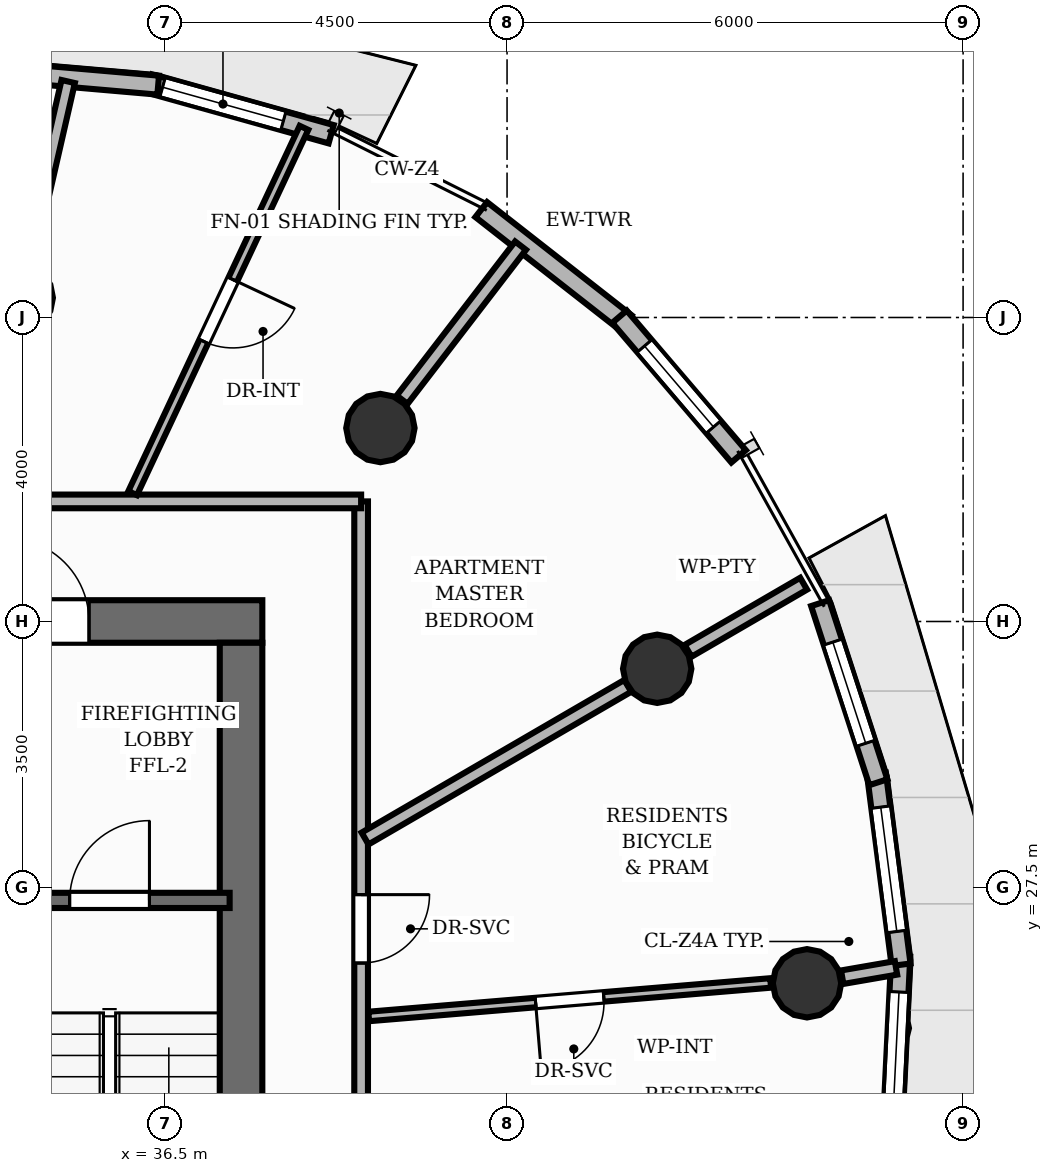
"""IFC4 building model, lengths in metres.
Left out: names, types, materials, properties, quantities, classifications, styles, units other than length and angle.
Written with IfcOpenShell. Run it as: python <this file> out.ifc"""

import sys

from ifc_helpers import new_model, si_unit, direction, frame, frame_2d, origin, origin_2d, place, context, subcontext, project, spatial, rectangle, circle, extrude, element, fill, save


model = new_model("IFC4")
c1 = context("Model", 3, precision=1e-05, world=origin(), true_north=direction((0.0, 1.0)))
c2 = subcontext(c1, "Body", "Model", "MODEL_VIEW")
j1 = project(units=[si_unit("LENGTHUNIT", "METRE"), si_unit("PLANEANGLEUNIT", "RADIAN")], contexts=[c1])
p1 = place(None, origin())
s1 = spatial("IfcSite", under=j1, at=p1, CompositionType="ELEMENT")
p2 = place(p1, origin())
s2 = spatial("IfcBuilding", under=s1, at=p2, CompositionType="ELEMENT")
p3 = place(p2, frame((0.0, 0.0, 191.84)))
s3 = spatial("IfcBuildingStorey", under=s2, at=p3, CompositionType="ELEMENT", Elevation=191.84)
p4 = place(p3, frame((26.22, 31.0, 0.0), z_axis=(0.0, 0.0, 1.0), x_axis=(1.0, 0.0, 0.0)))
e1 = element("IfcWall", 1, at=p4, inside=s3, PredefinedType="SHEAR", context=c2, shape_type="SweptSolid", body=[
    extrude(rectangle(XDim=11.56, YDim=0.56, at=frame_2d((5.78, 0.0))), origin(), (0.0, 0.0, 1.0), 3.2),
])
p5 = place(p4, frame((8.18, 0.0, 0.0)))
e2 = element("IfcOpeningElement", 2, at=p5, cuts=e1, PredefinedType="OPENING", context=c2, shape_type="SweptSolid", body=[
    extrude(rectangle(XDim=1.1, YDim=2.15, at=frame_2d((0.55, 1.075))), frame((0.0, 0.29, 0.0), z_axis=(0.0, -1.0, 0.0), x_axis=(1.0, 0.0, 0.0)), (0.0, 0.0, 1.0), 0.58),
])
p6 = place(p4, frame((0.805, 0.0, 0.0)))
e3 = element("IfcOpeningElement", 3, at=p6, cuts=e1, PredefinedType="OPENING", context=c2, shape_type="SweptSolid", body=[
    extrude(rectangle(XDim=1.05, YDim=2.15, at=frame_2d((0.525, 1.075))), frame((0.0, 0.29, 0.0), z_axis=(0.0, -1.0, 0.0), x_axis=(1.0, 0.0, 0.0)), (0.0, 0.0, 1.0), 0.58),
])
p7 = place(p4, frame((2.555, 0.0, 0.0)))
e4 = element("IfcOpeningElement", 4, at=p7, cuts=e1, PredefinedType="OPENING", context=c2, shape_type="SweptSolid", body=[
    extrude(rectangle(XDim=1.05, YDim=2.15, at=frame_2d((0.525, 1.075))), frame((0.0, 0.29, 0.0), z_axis=(0.0, -1.0, 0.0), x_axis=(1.0, 0.0, 0.0)), (0.0, 0.0, 1.0), 0.58),
])
p8 = place(p4, frame((4.305, 0.0, 0.0)))
e5 = element("IfcOpeningElement", 5, at=p8, cuts=e1, PredefinedType="OPENING", context=c2, shape_type="SweptSolid", body=[
    extrude(rectangle(XDim=1.05, YDim=2.15, at=frame_2d((0.525, 1.075))), frame((0.0, 0.29, 0.0), z_axis=(0.0, -1.0, 0.0), x_axis=(1.0, 0.0, 0.0)), (0.0, 0.0, 1.0), 0.58),
])
p9 = place(p3, frame((37.5, 17.28, 0.0), z_axis=(0.0, 0.0, 1.0), x_axis=(0.0, 1.0, 0.0)))
e6 = element("IfcWall", 6, at=p9, inside=s3, PredefinedType="SHEAR", context=c2, shape_type="SweptSolid", body=[
    extrude(rectangle(XDim=13.44, YDim=0.56, at=frame_2d((6.72, 0.0))), origin(), (0.0, 0.0, 1.0), 3.2),
])
for number, where, z_axis, x_axis in (
    (7, (44.946, 26.24, 0.0), (0.0, 0.0, 1.0), (1.0, 0.0, 0.0)),
    (8, (42.975, 30.378, 0.0), (0.0, 0.0, 1.0), (1.0, 0.0, 0.0)),
    (9, (39.333, 33.545, 0.0), (0.0, 0.0, 1.0), (1.0, 0.0, 0.0)),
    (10, (34.575, 35.26, 0.0), (0.0, 0.0, 1.0), (1.0, 0.0, 0.0)),
):
    element("IfcColumn", number, at=place(p3, frame(where, z_axis=z_axis, x_axis=x_axis)), inside=s3, PredefinedType="COLUMN", context=c2, shape_type="SweptSolid", body=[
        extrude(circle(Radius=0.45, at=origin_2d()), origin(), (0.0, 0.0, 1.0), 3.2),
    ])
p10 = place(p3, frame((40.661, 36.42, 0.0), z_axis=(0.0, 0.0, 1.0), x_axis=(0.787404715416, -0.616436382883, 0.0)))
e11 = element("IfcWall", 11, at=p10, inside=s3, PredefinedType="SOLIDWALL", context=c2, shape_type="SweptSolid", body=[
    extrude(rectangle(XDim=2.415, YDim=0.25, at=frame_2d((1.208, 0.0))), origin(), (0.0, 0.0, 1.0), 2.96),
])
p11 = place(p3, frame((36.299, 38.077, 0.0), z_axis=(0.0, 0.0, 1.0), x_axis=(0.96316841201, -0.26889888454, 0.0)))
e12 = element("IfcWall", 12, at=p11, inside=s3, PredefinedType="SOLIDWALL", context=c2, shape_type="SweptSolid", body=[
    extrude(rectangle(XDim=2.478, YDim=0.25, at=frame_2d((1.239, 0.0))), origin(), (0.0, 0.0, 1.0), 2.96),
])
p12 = place(p11, frame((0.175, 0.0, 0.85)))
e13 = element("IfcOpeningElement", 13, at=p12, cuts=e12, PredefinedType="OPENING", context=c2, shape_type="SweptSolid", body=[
    extrude(rectangle(XDim=1.65, YDim=1.55, at=frame_2d((0.825, 0.775))), frame((0.0, 0.135, 0.0), z_axis=(0.0, -1.0, 0.0), x_axis=(1.0, 0.0, 0.0)), (0.0, 0.0, 1.0), 0.27),
])
p13 = place(p3, frame((33.888, 38.276, 0.0), z_axis=(0.0, 0.0, 1.0), x_axis=(0.996260822813, -0.08639660252, 0.0)))
e14 = element("IfcWall", 14, at=p13, inside=s3, PredefinedType="SOLIDWALL", context=c2, shape_type="SweptSolid", body=[
    extrude(rectangle(XDim=2.532, YDim=0.25, at=frame_2d((1.266, 0.0))), origin(), (0.0, 0.0, 1.0), 2.96),
])
p14 = place(p3, frame((46.18, 26.595, 0.0), z_axis=(0.0, 0.0, 1.0), x_axis=(-0.048688181414, -0.99881402723, 0.0)))
e15 = element("IfcWall", 15, at=p14, inside=s3, PredefinedType="SOLIDWALL", context=c2, shape_type="SweptSolid", body=[
    extrude(rectangle(XDim=2.593, YDim=0.25, at=frame_2d((1.296, 0.0))), origin(), (0.0, 0.0, 1.0), 2.96),
])
p15 = place(p14, frame((0.471, 0.0, 0.85)))
e16 = element("IfcOpeningElement", 16, at=p15, cuts=e15, PredefinedType="OPENING", context=c2, shape_type="SweptSolid", body=[
    extrude(rectangle(XDim=1.65, YDim=1.55, at=frame_2d((0.825, 0.775))), frame((0.0, 0.135, 0.0), z_axis=(0.0, -1.0, 0.0), x_axis=(1.0, 0.0, 0.0)), (0.0, 0.0, 1.0), 0.27),
])
p16 = place(p3, frame((45.86, 28.995, 0.0), z_axis=(0.0, 0.0, 1.0), x_axis=(0.128057007482, -0.991766808698, 0.0)))
e17 = element("IfcWall", 17, at=p16, inside=s3, PredefinedType="SOLIDWALL", context=c2, shape_type="SweptSolid", body=[
    extrude(rectangle(XDim=2.532, YDim=0.25, at=frame_2d((1.266, 0.0))), origin(), (0.0, 0.0, 1.0), 2.96),
])
p17 = place(p16, frame((0.441, 0.0, 0.85)))
e18 = element("IfcOpeningElement", 18, at=p17, cuts=e17, PredefinedType="OPENING", context=c2, shape_type="SweptSolid", body=[
    extrude(rectangle(XDim=1.65, YDim=1.55, at=frame_2d((0.825, 0.775))), frame((0.0, 0.135, 0.0), z_axis=(0.0, -1.0, 0.0), x_axis=(1.0, 0.0, 0.0)), (0.0, 0.0, 1.0), 0.27),
])
p18 = place(p3, frame((45.119, 31.241, 0.0), z_axis=(0.0, 0.0, 1.0), x_axis=(0.309005861828, -0.951060133407, 0.0)))
e19 = element("IfcWall", 19, at=p18, inside=s3, PredefinedType="SOLIDWALL", context=c2, shape_type="SweptSolid", body=[
    extrude(rectangle(XDim=2.478, YDim=0.25, at=frame_2d((1.239, 0.0))), origin(), (0.0, 0.0, 1.0), 2.96),
])
p19 = place(p18, frame((0.539, 0.0, 0.85)))
e20 = element("IfcOpeningElement", 20, at=p19, cuts=e19, PredefinedType="OPENING", context=c2, shape_type="SweptSolid", body=[
    extrude(rectangle(XDim=1.4, YDim=1.55, at=frame_2d((0.7, 0.775))), frame((0.0, 0.135, 0.0), z_axis=(0.0, -1.0, 0.0), x_axis=(1.0, 0.0, 0.0)), (0.0, 0.0, 1.0), 0.27),
])
p20 = place(p3, frame((42.479, 35.01, 0.0), z_axis=(0.0, 0.0, 1.0), x_axis=(0.648874307696, -0.760895612297, 0.0)))
e21 = element("IfcWall", 21, at=p20, inside=s3, PredefinedType="SOLIDWALL", context=c2, shape_type="SweptSolid", body=[
    extrude(rectangle(XDim=2.415, YDim=0.25, at=frame_2d((1.208, 0.0))), origin(), (0.0, 0.0, 1.0), 2.96),
])
p21 = place(p20, frame((0.507, 0.0, 0.85)))
e22 = element("IfcOpeningElement", 22, at=p21, cuts=e21, PredefinedType="OPENING", context=c2, shape_type="SweptSolid", body=[
    extrude(rectangle(XDim=1.4, YDim=1.55, at=frame_2d((0.7, 0.775))), frame((0.0, 0.135, 0.0), z_axis=(0.0, -1.0, 0.0), x_axis=(1.0, 0.0, 0.0)), (0.0, 0.0, 1.0), 0.27),
])
p22 = place(p3, frame((34.11, 27.33, 0.0), z_axis=(0.0, 0.0, 1.0), x_axis=(1.0, 0.0, 0.0)))
e23 = element("IfcWall", 23, at=p22, inside=s3, PredefinedType="SHEAR", context=c2, shape_type="SweptSolid", body=[
    extrude(rectangle(XDim=3.24, YDim=0.2, at=frame_2d((1.62, 0.0))), origin(), (0.0, 0.0, 1.0), 3.2),
])
p23 = place(p22, frame((1.135, 0.0, 0.0)))
e24 = element("IfcOpeningElement", 24, at=p23, cuts=e23, PredefinedType="OPENING", context=c2, shape_type="SweptSolid", body=[
    extrude(rectangle(XDim=1.05, YDim=2.15, at=frame_2d((0.525, 1.075))), frame((0.0, 0.11, 0.0), z_axis=(0.0, -1.0, 0.0), x_axis=(1.0, 0.0, 0.0)), (0.0, 0.0, 1.0), 0.22),
])
p24 = place(p3, frame((45.409, 26.32, 0.0), z_axis=(0.0, 0.0, 1.0), x_axis=(0.985336223431, 0.170623933826, 0.0)))
e25 = element("IfcWall", 25, at=p24, inside=s3, PredefinedType="PARTITIONING", context=c2, shape_type="SweptSolid", body=[
    extrude(rectangle(XDim=0.718, YDim=0.18, at=frame_2d((0.359, 0.0))), origin(), (0.0, 0.0, 1.0), 2.403),
])
p25 = place(p3, frame((43.382, 30.614, 0.0), z_axis=(0.0, 0.0, 1.0), x_axis=(0.86461381872, 0.502437005482, 0.0)))
e26 = element("IfcWall", 26, at=p25, inside=s3, PredefinedType="PARTITIONING", context=c2, shape_type="SweptSolid", body=[
    extrude(rectangle(XDim=1.758, YDim=0.18, at=frame_2d((0.879, 0.0))), origin(), (0.0, 0.0, 1.0), 2.403),
])
p26 = place(p3, frame((39.62, 33.918, 0.0), z_axis=(0.0, 0.0, 1.0), x_axis=(0.609249164273, 0.792978849549, 0.0)))
e27 = element("IfcWall", 27, at=p26, inside=s3, PredefinedType="PARTITIONING", context=c2, shape_type="SweptSolid", body=[
    extrude(rectangle(XDim=2.557, YDim=0.18, at=frame_2d((1.278, 0.0))), origin(), (0.0, 0.0, 1.0), 2.403),
])
p27 = place(p3, frame((34.68, 35.718, 0.0), z_axis=(0.0, 0.0, 1.0), x_axis=(0.222943921747, 0.974831271429, 0.0)))
e28 = element("IfcWall", 28, at=p27, inside=s3, PredefinedType="PARTITIONING", context=c2, shape_type="SweptSolid", body=[
    extrude(rectangle(XDim=2.448, YDim=0.18, at=frame_2d((1.224, 0.0))), origin(), (0.0, 0.0, 1.0), 2.403),
])
p28 = place(p3, frame((39.08, 32.58, 0.0), z_axis=(0.0, 0.0, 1.0), x_axis=(0.0, -1.0, 0.0)))
e29 = element("IfcWall", 29, at=p28, inside=s3, PredefinedType="PARTITIONING", context=c2, shape_type="SweptSolid", body=[
    extrude(rectangle(XDim=8.094, YDim=0.18, at=frame_2d((4.047, 0.0))), origin(), (0.0, 0.0, 1.0), 2.955),
])
p29 = place(p28, frame((5.174, 0.0, 0.0)))
e30 = element("IfcOpeningElement", 30, at=p29, cuts=e29, PredefinedType="OPENING", context=c2, shape_type="SweptSolid", body=[
    extrude(rectangle(XDim=0.9, YDim=2.1, at=frame_2d((0.45, 1.05))), frame((0.0, 0.1, 0.0), z_axis=(0.0, -1.0, 0.0), x_axis=(1.0, 0.0, 0.0)), (0.0, 0.0, 1.0), 0.2),
])
p30 = place(p3, frame((24.92, 32.58, 0.0), z_axis=(0.0, 0.0, 1.0), x_axis=(1.0, 0.0, 0.0)))
e31 = element("IfcWall", 31, at=p30, inside=s3, PredefinedType="PARTITIONING", context=c2, shape_type="SweptSolid", body=[
    extrude(rectangle(XDim=14.16, YDim=0.18, at=frame_2d((7.08, 0.0))), origin(), (0.0, 0.0, 1.0), 2.955),
])
p31 = place(p30, frame((8.186, 0.0, 0.0)))
e32 = element("IfcOpeningElement", 32, at=p31, cuts=e31, PredefinedType="OPENING", context=c2, shape_type="SweptSolid", body=[
    extrude(rectangle(XDim=1.05, YDim=2.15, at=frame_2d((0.525, 1.075))), frame((0.0, 0.1, 0.0), z_axis=(0.0, -1.0, 0.0), x_axis=(1.0, 0.0, 0.0)), (0.0, 0.0, 1.0), 0.2),
])
p32 = place(p30, frame((2.119, 0.0, 0.0)))
e33 = element("IfcOpeningElement", 33, at=p32, cuts=e31, PredefinedType="OPENING", context=c2, shape_type="SweptSolid", body=[
    extrude(rectangle(XDim=0.9, YDim=2.1, at=frame_2d((0.45, 1.05))), frame((0.0, 0.1, 0.0), z_axis=(0.0, -1.0, 0.0), x_axis=(1.0, 0.0, 0.0)), (0.0, 0.0, 1.0), 0.2),
])
p33 = place(p3, frame((44.468, 26.244, 0.0), z_axis=(0.0, 0.0, 1.0), x_axis=(-0.996538774807, -0.083129238578, 0.0)))
e34 = element("IfcWall", 34, at=p33, inside=s3, PredefinedType="PARTITIONING", context=c2, shape_type="SweptSolid", body=[
    extrude(rectangle(XDim=5.307, YDim=0.125, at=frame_2d((2.653, 0.0))), origin(), (0.0, 0.0, 1.0), 2.403),
])
p34 = place(p33, frame((2.204, 0.0, 0.0)))
e35 = element("IfcOpeningElement", 35, at=p34, cuts=e34, PredefinedType="OPENING", context=c2, shape_type="SweptSolid", body=[
    extrude(rectangle(XDim=0.9, YDim=2.1, at=frame_2d((0.45, 1.05))), frame((0.0, 0.073, 0.0), z_axis=(0.0, -1.0, 0.0), x_axis=(1.0, 0.0, 0.0)), (0.0, 0.0, 1.0), 0.145),
])
p35 = place(p3, frame((39.132, 28.144, 0.0), z_axis=(0.0, 0.0, 1.0), x_axis=(0.864597268714, 0.502465484319, 0.0)))
e36 = element("IfcWall", 36, at=p35, inside=s3, PredefinedType="PARTITIONING", context=c2, shape_type="SweptSolid", body=[
    extrude(rectangle(XDim=3.998, YDim=0.18, at=frame_2d((1.999, 0.0))), origin(), (0.0, 0.0, 1.0), 2.403),
])
p36 = place(p3, frame((38.328, 37.496, 0.0), z_axis=(0.0, 0.0, 1.0), x_axis=(-0.424538730781, -0.905409777983, 0.0)))
e37 = element("IfcWall", 37, at=p36, inside=s3, PredefinedType="PARTITIONING", context=c2, shape_type="SweptSolid", body=[
    extrude(rectangle(XDim=5.309, YDim=0.125, at=frame_2d((2.655, 0.0))), origin(), (0.0, 0.0, 1.0), 2.955),
])
p37 = place(p36, frame((2.205, 0.0, 0.0)))
e38 = element("IfcOpeningElement", 38, at=p37, cuts=e37, PredefinedType="OPENING", context=c2, shape_type="SweptSolid", body=[
    extrude(rectangle(XDim=0.9, YDim=2.1, at=frame_2d((0.45, 1.05))), frame((0.0, 0.073, 0.0), z_axis=(0.0, -1.0, 0.0), x_axis=(1.0, 0.0, 0.0)), (0.0, 0.0, 1.0), 0.145),
])
p38 = place(p12, origin())
e39 = element("IfcWindow", 39, at=p38, inside=s3, PartitioningType="SINGLE_PANEL", PredefinedType="WINDOW", context=c2, shape_type="SweptSolid", body=[
    extrude(rectangle(XDim=1.65, YDim=1.55, at=frame_2d((0.825, 0.775))), frame((0.0, 0.03, 0.0), z_axis=(0.0, -1.0, 0.0), x_axis=(1.0, 0.0, 0.0)), (0.0, 0.0, 1.0), 0.06),
])
fill(e13, e39)
p39 = place(p15, origin())
e40 = element("IfcWindow", 40, at=p39, inside=s3, PartitioningType="SINGLE_PANEL", PredefinedType="WINDOW", context=c2, shape_type="SweptSolid", body=[
    extrude(rectangle(XDim=1.65, YDim=1.55, at=frame_2d((0.825, 0.775))), frame((0.0, 0.03, 0.0), z_axis=(0.0, -1.0, 0.0), x_axis=(1.0, 0.0, 0.0)), (0.0, 0.0, 1.0), 0.06),
])
fill(e16, e40)
p40 = place(p17, origin())
e41 = element("IfcWindow", 41, at=p40, inside=s3, PartitioningType="SINGLE_PANEL", PredefinedType="WINDOW", context=c2, shape_type="SweptSolid", body=[
    extrude(rectangle(XDim=1.65, YDim=1.55, at=frame_2d((0.825, 0.775))), frame((0.0, 0.03, 0.0), z_axis=(0.0, -1.0, 0.0), x_axis=(1.0, 0.0, 0.0)), (0.0, 0.0, 1.0), 0.06),
])
fill(e18, e41)
p41 = place(p19, origin())
e42 = element("IfcWindow", 42, at=p41, inside=s3, PartitioningType="SINGLE_PANEL", PredefinedType="WINDOW", context=c2, shape_type="SweptSolid", body=[
    extrude(rectangle(XDim=1.4, YDim=1.55, at=frame_2d((0.7, 0.775))), frame((0.0, 0.03, 0.0), z_axis=(0.0, -1.0, 0.0), x_axis=(1.0, 0.0, 0.0)), (0.0, 0.0, 1.0), 0.06),
])
fill(e20, e42)
p42 = place(p21, origin())
e43 = element("IfcWindow", 43, at=p42, inside=s3, PartitioningType="SINGLE_PANEL", PredefinedType="WINDOW", context=c2, shape_type="SweptSolid", body=[
    extrude(rectangle(XDim=1.4, YDim=1.55, at=frame_2d((0.7, 0.775))), frame((0.0, 0.03, 0.0), z_axis=(0.0, -1.0, 0.0), x_axis=(1.0, 0.0, 0.0)), (0.0, 0.0, 1.0), 0.06),
])
fill(e22, e43)
p43 = place(p23, origin())
e44 = element("IfcDoor", 44, at=p43, inside=s3, OperationType="SINGLE_SWING_RIGHT", PredefinedType="DOOR", context=c2, shape_type="SweptSolid", body=[
    extrude(rectangle(XDim=1.05, YDim=2.15, at=frame_2d((0.525, 1.075))), frame((0.0, 0.025, 0.0), z_axis=(0.0, -1.0, 0.0), x_axis=(1.0, 0.0, 0.0)), (0.0, 0.0, 1.0), 0.05),
])
fill(e24, e44)
p44 = place(p5, origin())
e45 = element("IfcDoor", 45, at=p44, inside=s3, OperationType="SINGLE_SWING_LEFT", PredefinedType="DOOR", context=c2, shape_type="SweptSolid", body=[
    extrude(rectangle(XDim=1.1, YDim=2.15, at=frame_2d((0.55, 1.075))), frame((0.0, 0.025, 0.0), z_axis=(0.0, -1.0, 0.0), x_axis=(1.0, 0.0, 0.0)), (0.0, 0.0, 1.0), 0.05),
])
fill(e2, e45)
p45 = place(p29, origin())
e46 = element("IfcDoor", 46, at=p45, inside=s3, OperationType="SINGLE_SWING_LEFT", PredefinedType="DOOR", context=c2, shape_type="SweptSolid", body=[
    extrude(rectangle(XDim=0.9, YDim=2.1, at=frame_2d((0.45, 1.05))), frame((0.0, 0.025, 0.0), z_axis=(0.0, -1.0, 0.0), x_axis=(1.0, 0.0, 0.0)), (0.0, 0.0, 1.0), 0.05),
])
fill(e30, e46)
p46 = place(p34, origin())
e47 = element("IfcDoor", 47, at=p46, inside=s3, OperationType="SINGLE_SWING_RIGHT", PredefinedType="DOOR", context=c2, shape_type="SweptSolid", body=[
    extrude(rectangle(XDim=0.9, YDim=2.1, at=frame_2d((0.45, 1.05))), frame((0.0, 0.025, 0.0), z_axis=(0.0, -1.0, 0.0), x_axis=(1.0, 0.0, 0.0)), (0.0, 0.0, 1.0), 0.05),
])
fill(e35, e47)
p47 = place(p37, origin())
e48 = element("IfcDoor", 48, at=p47, inside=s3, OperationType="SINGLE_SWING_LEFT", PredefinedType="DOOR", context=c2, shape_type="SweptSolid", body=[
    extrude(rectangle(XDim=0.9, YDim=2.1, at=frame_2d((0.45, 1.05))), frame((0.0, 0.025, 0.0), z_axis=(0.0, -1.0, 0.0), x_axis=(1.0, 0.0, 0.0)), (0.0, 0.0, 1.0), 0.05),
])
fill(e38, e48)
save(model, sys.argv[1])
